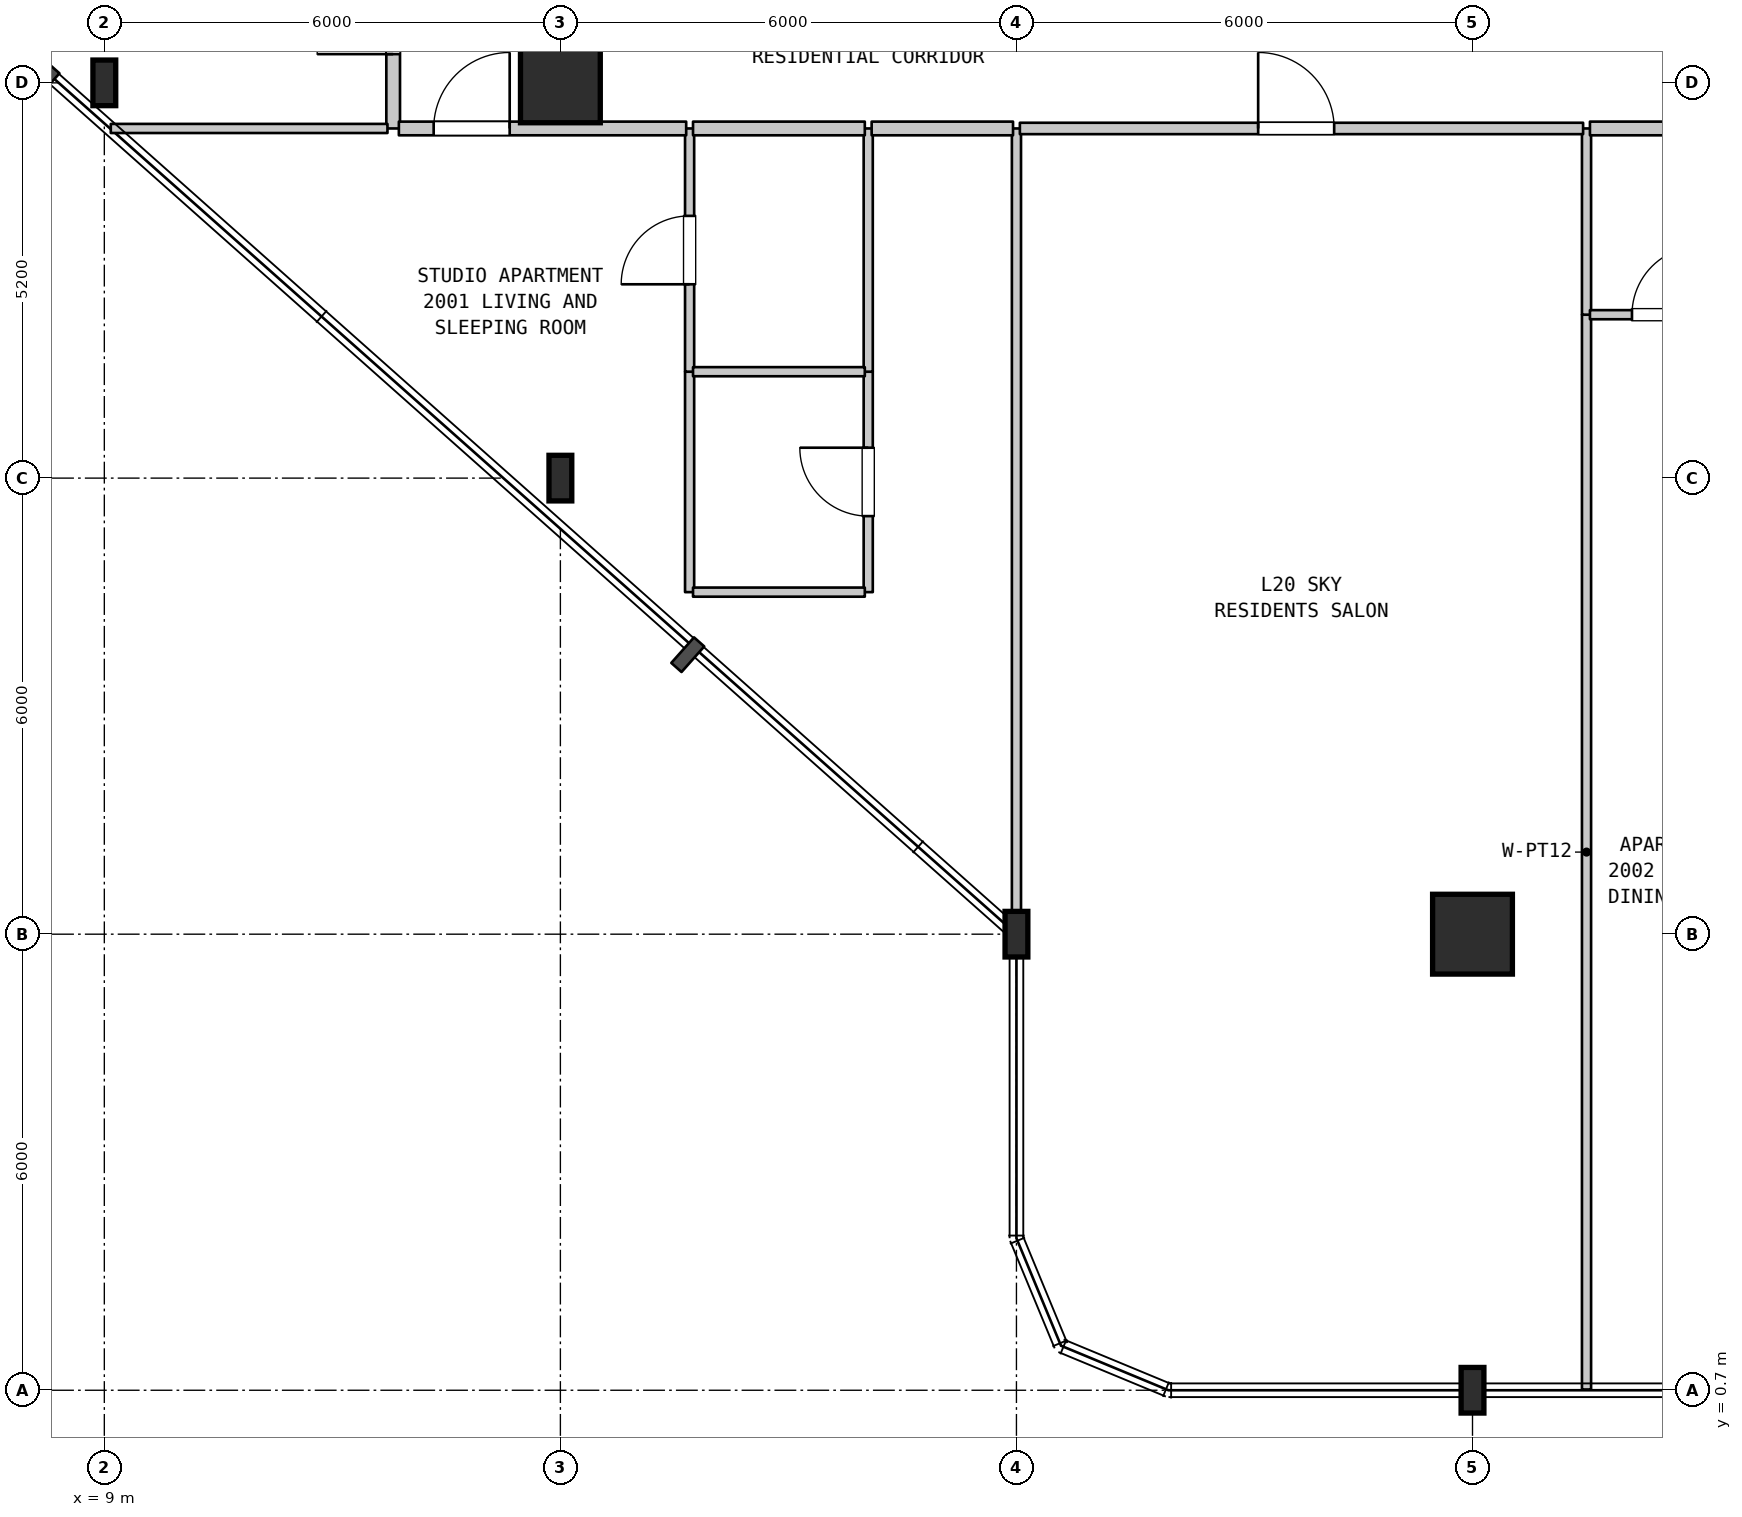
"""IFC4 building model, lengths in metres.
Left out: names, types, materials, properties, quantities, classifications, styles, units other than length and angle.
Written with IfcOpenShell. Run it as: python <this file> out.ifc"""

import sys

from ifc_helpers import new_model, si_unit, direction, frame, frame_2d, origin, origin_2d, place, context, subcontext, project, spatial, rectangle, i_section, extrude, element, fill, save


model = new_model("IFC4")
c1 = context("Model", 3, precision=1e-05, world=origin(), true_north=direction((0.0, 1.0)))
c2 = subcontext(c1, "Body", "Model", "MODEL_VIEW")
j1 = project(units=[si_unit("LENGTHUNIT", "METRE"), si_unit("PLANEANGLEUNIT", "RADIAN")], contexts=[c1])
p1 = place(None, origin())
s1 = spatial("IfcSite", under=j1, at=p1, CompositionType="ELEMENT")
p2 = place(p1, origin())
s2 = spatial("IfcBuilding", under=s1, at=p2, CompositionType="ELEMENT")
p3 = place(p2, frame((0.0, 0.0, 86.4)))
s3 = spatial("IfcBuildingStorey", under=s2, at=p3, CompositionType="ELEMENT", Elevation=86.4)
for number, where, z_axis, x_axis in (
    (1, (9.0, 17.9, 0.0), (0.0, 0.0, 1.0), (1.0, 0.0, 0.0)),
    (2, (15.0, 12.7, 0.0), (0.0, 0.0, 1.0), (1.0, 0.0, 0.0)),
):
    element("IfcColumn", number, at=place(p3, frame(where, z_axis=z_axis, x_axis=x_axis)), inside=s3, PredefinedType="COLUMN", context=c2, shape_type="SweptSolid", body=[
        extrude(i_section(OverallWidth=0.3, OverallDepth=0.6, WebThickness=0.015, FlangeThickness=0.03, FilletRadius=0.027, at=origin_2d()), origin(), (0.0, 0.0, 1.0), 4.5),
    ])
p4 = place(p3, frame((15.0, 17.9, 0.0), z_axis=(0.0, 0.0, 1.0), x_axis=(1.0, 0.0, 0.0)))
e3 = element("IfcColumn", 3, at=p4, inside=s3, PredefinedType="COLUMN", context=c2, shape_type="SweptSolid", body=[
    extrude(rectangle(XDim=1.05, YDim=1.05, at=origin_2d()), origin(), (0.0, 0.0, 1.0), 4.5),
])
for number, where, z_axis, x_axis in (
    (4, (21.0, 6.7, 0.0), (0.0, 0.0, 1.0), (1.0, 0.0, 0.0)),
    (5, (27.0, 0.7, 0.0), (0.0, 0.0, 1.0), (1.0, 0.0, 0.0)),
):
    element("IfcColumn", number, at=place(p3, frame(where, z_axis=z_axis, x_axis=x_axis)), inside=s3, PredefinedType="COLUMN", context=c2, shape_type="SweptSolid", body=[
        extrude(i_section(OverallWidth=0.3, OverallDepth=0.6, WebThickness=0.015, FlangeThickness=0.03, FilletRadius=0.027, at=origin_2d()), origin(), (0.0, 0.0, 1.0), 4.5),
    ])
p5 = place(p3, frame((27.0, 6.7, 0.0), z_axis=(0.0, 0.0, 1.0), x_axis=(1.0, 0.0, 0.0)))
e6 = element("IfcColumn", 6, at=p5, inside=s3, PredefinedType="COLUMN", context=c2, shape_type="SweptSolid", body=[
    extrude(rectangle(XDim=1.05, YDim=1.05, at=origin_2d()), origin(), (0.0, 0.0, 1.0), 4.5),
])
p6 = place(p3, frame((12.8, 17.3, 0.0), z_axis=(0.0, 0.0, 1.0), x_axis=(0.0, 1.0, 0.0)))
e7 = element("IfcWall", 7, at=p6, inside=s3, PredefinedType="STANDARD", context=c2, shape_type="SweptSolid", body=[
    extrude(rectangle(XDim=3.1, YDim=0.18, at=frame_2d((1.55, 0.0))), origin(), (0.0, 0.0, 1.0), 4.185),
])
p7 = place(p6, frame((0.978, 0.0, 0.0)))
e8 = element("IfcOpeningElement", 8, at=p7, cuts=e7, PredefinedType="OPENING", context=c2, shape_type="SweptSolid", body=[
    extrude(rectangle(XDim=1.0, YDim=2.15, at=frame_2d((0.5, 1.075))), frame((0.0, 0.1, 0.0), z_axis=(0.0, -1.0, 0.0), x_axis=(1.0, 0.0, 0.0)), (0.0, 0.0, 1.0), 0.2),
])
p8 = place(p3, frame((16.7, 11.2, 0.0), z_axis=(0.0, 0.0, 1.0), x_axis=(0.0, 1.0, 0.0)))
e9 = element("IfcWall", 9, at=p8, inside=s3, PredefinedType="PARTITIONING", context=c2, shape_type="SweptSolid", body=[
    extrude(rectangle(XDim=2.9, YDim=0.12, at=frame_2d((1.45, 0.0))), origin(), (0.0, 0.0, 1.0), 4.185),
])
p9 = place(p3, frame((16.7, 14.1, 0.0), z_axis=(0.0, 0.0, 1.0), x_axis=(0.0, 1.0, 0.0)))
e10 = element("IfcWall", 10, at=p9, inside=s3, PredefinedType="PARTITIONING", context=c2, shape_type="SweptSolid", body=[
    extrude(rectangle(XDim=3.2, YDim=0.12, at=frame_2d((1.6, 0.0))), origin(), (0.0, 0.0, 1.0), 4.185),
])
p10 = place(p9, frame((1.15, 0.0, 0.0)))
e11 = element("IfcOpeningElement", 11, at=p10, cuts=e10, PredefinedType="OPENING", context=c2, shape_type="SweptSolid", body=[
    extrude(rectangle(XDim=0.9, YDim=2.15, at=frame_2d((0.45, 1.075))), frame((0.0, 0.07, 0.0), z_axis=(0.0, -1.0, 0.0), x_axis=(1.0, 0.0, 0.0)), (0.0, 0.0, 1.0), 0.14),
])
p11 = place(p3, frame((19.05, 11.2, 0.0), z_axis=(0.0, 0.0, 1.0), x_axis=(0.0, 1.0, 0.0)))
e12 = element("IfcWall", 12, at=p11, inside=s3, PredefinedType="PARTITIONING", context=c2, shape_type="SweptSolid", body=[
    extrude(rectangle(XDim=2.9, YDim=0.12, at=frame_2d((1.45, 0.0))), origin(), (0.0, 0.0, 1.0), 4.185),
])
p12 = place(p11, frame((1.0, 0.0, 0.0)))
e13 = element("IfcOpeningElement", 13, at=p12, cuts=e12, PredefinedType="OPENING", context=c2, shape_type="SweptSolid", body=[
    extrude(rectangle(XDim=0.9, YDim=2.1, at=frame_2d((0.45, 1.05))), frame((0.0, 0.07, 0.0), z_axis=(0.0, -1.0, 0.0), x_axis=(1.0, 0.0, 0.0)), (0.0, 0.0, 1.0), 0.14),
])
p13 = place(p3, frame((19.05, 14.1, 0.0), z_axis=(0.0, 0.0, 1.0), x_axis=(0.0, 1.0, 0.0)))
e14 = element("IfcWall", 14, at=p13, inside=s3, PredefinedType="PARTITIONING", context=c2, shape_type="SweptSolid", body=[
    extrude(rectangle(XDim=3.2, YDim=0.12, at=frame_2d((1.6, 0.0))), origin(), (0.0, 0.0, 1.0), 4.185),
])
p14 = place(p3, frame((21.0, 6.71, 0.0), z_axis=(0.0, 0.0, 1.0), x_axis=(0.0, 1.0, 0.0)))
e15 = element("IfcWall", 15, at=p14, inside=s3, PredefinedType="PARTITIONING", context=c2, shape_type="SweptSolid", body=[
    extrude(rectangle(XDim=10.59, YDim=0.12, at=frame_2d((5.295, 0.0))), origin(), (0.0, 0.0, 1.0), 4.185),
])
p15 = place(p3, frame((28.5, 0.71, 0.0), z_axis=(0.0, 0.0, 1.0), x_axis=(0.0, 1.0, 0.0)))
e16 = element("IfcWall", 16, at=p15, inside=s3, PredefinedType="PARTITIONING", context=c2, shape_type="SweptSolid", body=[
    extrude(rectangle(XDim=14.14, YDim=0.12, at=frame_2d((7.07, 0.0))), origin(), (0.0, 0.0, 1.0), 4.185),
])
p16 = place(p3, frame((28.5, 14.85, 0.0), z_axis=(0.0, 0.0, 1.0), x_axis=(0.0, 1.0, 0.0)))
e17 = element("IfcWall", 17, at=p16, inside=s3, PredefinedType="PARTITIONING", context=c2, shape_type="SweptSolid", body=[
    extrude(rectangle(XDim=2.45, YDim=0.12, at=frame_2d((1.225, 0.0))), origin(), (0.0, 0.0, 1.0), 4.185),
])
for number, where, z_axis, x_axis in (
    (18, (16.745, 11.2, 0.0), (0.0, 0.0, 1.0), (1.0, 0.0, 0.0)),
    (19, (16.745, 14.1, 0.0), (0.0, 0.0, 1.0), (1.0, 0.0, 0.0)),
):
    element("IfcWall", number, at=place(p3, frame(where, z_axis=z_axis, x_axis=x_axis)), inside=s3, PredefinedType="PARTITIONING", context=c2, shape_type="SweptSolid", body=[
        extrude(rectangle(XDim=2.26, YDim=0.12, at=frame_2d((1.13, 0.0))), origin(), (0.0, 0.0, 1.0), 4.185),
    ])
p17 = place(p3, frame((28.545, 14.85, 0.0), z_axis=(0.0, 0.0, 1.0), x_axis=(1.0, 0.0, 0.0)))
e20 = element("IfcWall", 20, at=p17, inside=s3, PredefinedType="PARTITIONING", context=c2, shape_type="SweptSolid", body=[
    extrude(rectangle(XDim=2.16, YDim=0.12, at=frame_2d((1.08, 0.0))), origin(), (0.0, 0.0, 1.0), 4.185),
])
p18 = place(p17, frame((0.553, 0.0, 0.0)))
e21 = element("IfcOpeningElement", 21, at=p18, cuts=e20, PredefinedType="OPENING", context=c2, shape_type="SweptSolid", body=[
    extrude(rectangle(XDim=0.9, YDim=2.15, at=frame_2d((0.45, 1.075))), frame((0.0, 0.07, 0.0), z_axis=(0.0, -1.0, 0.0), x_axis=(1.0, 0.0, 0.0)), (0.0, 0.0, 1.0), 0.14),
])
p19 = place(p3, frame((9.085, 17.3, 0.0), z_axis=(0.0, 0.0, 1.0), x_axis=(1.0, 0.0, 0.0)))
e22 = element("IfcWall", 22, at=p19, inside=s3, PredefinedType="PARTITIONING", context=c2, shape_type="SweptSolid", body=[
    extrude(rectangle(XDim=3.64, YDim=0.12, at=frame_2d((1.82, 0.0))), origin(), (0.0, 0.0, 1.0), 4.185),
])
p20 = place(p3, frame((12.875, 17.3, 0.0), z_axis=(0.0, 0.0, 1.0), x_axis=(1.0, 0.0, 0.0)))
e23 = element("IfcWall", 23, at=p20, inside=s3, PredefinedType="STANDARD", context=c2, shape_type="SweptSolid", body=[
    extrude(rectangle(XDim=3.78, YDim=0.18, at=frame_2d((1.89, 0.0))), origin(), (0.0, 0.0, 1.0), 4.185),
])
p21 = place(p20, frame((0.458, 0.0, 0.0)))
e24 = element("IfcOpeningElement", 24, at=p21, cuts=e23, PredefinedType="OPENING", context=c2, shape_type="SweptSolid", body=[
    extrude(rectangle(XDim=1.0, YDim=2.15, at=frame_2d((0.5, 1.075))), frame((0.0, 0.1, 0.0), z_axis=(0.0, -1.0, 0.0), x_axis=(1.0, 0.0, 0.0)), (0.0, 0.0, 1.0), 0.2),
])
p22 = place(p3, frame((16.745, 17.3, 0.0), z_axis=(0.0, 0.0, 1.0), x_axis=(1.0, 0.0, 0.0)))
e25 = element("IfcWall", 25, at=p22, inside=s3, PredefinedType="STANDARD", context=c2, shape_type="SweptSolid", body=[
    extrude(rectangle(XDim=2.26, YDim=0.18, at=frame_2d((1.13, 0.0))), origin(), (0.0, 0.0, 1.0), 4.185),
])
p23 = place(p3, frame((19.095, 17.3, 0.0), z_axis=(0.0, 0.0, 1.0), x_axis=(1.0, 0.0, 0.0)))
e26 = element("IfcWall", 26, at=p23, inside=s3, PredefinedType="STANDARD", context=c2, shape_type="SweptSolid", body=[
    extrude(rectangle(XDim=1.86, YDim=0.18, at=frame_2d((0.93, 0.0))), origin(), (0.0, 0.0, 1.0), 4.185),
])
p24 = place(p3, frame((21.045, 17.3, 0.0), z_axis=(0.0, 0.0, 1.0), x_axis=(1.0, 0.0, 0.0)))
e27 = element("IfcWall", 27, at=p24, inside=s3, PredefinedType="STANDARD", context=c2, shape_type="SweptSolid", body=[
    extrude(rectangle(XDim=7.41, YDim=0.15, at=frame_2d((3.705, 0.0))), origin(), (0.0, 0.0, 1.0), 4.185),
])
p25 = place(p24, frame((3.135, 0.0, 0.0)))
e28 = element("IfcOpeningElement", 28, at=p25, cuts=e27, PredefinedType="OPENING", context=c2, shape_type="SweptSolid", body=[
    extrude(rectangle(XDim=1.0, YDim=2.15, at=frame_2d((0.5, 1.075))), frame((0.0, 0.085, 0.0), z_axis=(0.0, -1.0, 0.0), x_axis=(1.0, 0.0, 0.0)), (0.0, 0.0, 1.0), 0.17),
])
p26 = place(p3, frame((28.545, 17.3, 0.0), z_axis=(0.0, 0.0, 1.0), x_axis=(1.0, 0.0, 0.0)))
e29 = element("IfcWall", 29, at=p26, inside=s3, PredefinedType="STANDARD", context=c2, shape_type="SweptSolid", body=[
    extrude(rectangle(XDim=4.72, YDim=0.18, at=frame_2d((2.36, 0.0))), origin(), (0.0, 0.0, 1.0), 4.185),
])
p27 = place(p26, frame((1.788, 0.0, 0.0)))
e30 = element("IfcOpeningElement", 30, at=p27, cuts=e29, PredefinedType="OPENING", context=c2, shape_type="SweptSolid", body=[
    extrude(rectangle(XDim=1.0, YDim=2.15, at=frame_2d((0.5, 1.075))), frame((0.0, 0.1, 0.0), z_axis=(0.0, -1.0, 0.0), x_axis=(1.0, 0.0, 0.0)), (0.0, 0.0, 1.0), 0.2),
])
p28 = place(p7, origin())
e31 = element("IfcDoor", 31, at=p28, inside=s3, OperationType="SINGLE_SWING_LEFT", PredefinedType="DOOR", context=c2, shape_type="SweptSolid", body=[
    extrude(rectangle(XDim=1.0, YDim=2.15, at=frame_2d((0.5, 1.075))), frame((0.0, 0.025, 0.0), z_axis=(0.0, -1.0, 0.0), x_axis=(1.0, 0.0, 0.0)), (0.0, 0.0, 1.0), 0.05),
])
fill(e8, e31)
p29 = place(p10, origin())
e32 = element("IfcDoor", 32, at=p29, inside=s3, OperationType="SINGLE_SWING_LEFT", PredefinedType="DOOR", context=c2, shape_type="SweptSolid", body=[
    extrude(rectangle(XDim=0.9, YDim=2.15, at=frame_2d((0.45, 1.075))), frame((0.0, 0.025, 0.0), z_axis=(0.0, -1.0, 0.0), x_axis=(1.0, 0.0, 0.0)), (0.0, 0.0, 1.0), 0.05),
])
fill(e11, e32)
p30 = place(p12, origin())
e33 = element("IfcDoor", 33, at=p30, inside=s3, OperationType="SINGLE_SWING_RIGHT", PredefinedType="DOOR", context=c2, shape_type="SweptSolid", body=[
    extrude(rectangle(XDim=0.9, YDim=2.1, at=frame_2d((0.45, 1.05))), frame((0.0, 0.025, 0.0), z_axis=(0.0, -1.0, 0.0), x_axis=(1.0, 0.0, 0.0)), (0.0, 0.0, 1.0), 0.05),
])
fill(e13, e33)
p31 = place(p18, origin())
e34 = element("IfcDoor", 34, at=p31, inside=s3, OperationType="SINGLE_SWING_RIGHT", PredefinedType="DOOR", context=c2, shape_type="SweptSolid", body=[
    extrude(rectangle(XDim=0.9, YDim=2.15, at=frame_2d((0.45, 1.075))), frame((0.0, 0.025, 0.0), z_axis=(0.0, -1.0, 0.0), x_axis=(1.0, 0.0, 0.0)), (0.0, 0.0, 1.0), 0.05),
])
fill(e21, e34)
p32 = place(p21, origin())
e35 = element("IfcDoor", 35, at=p32, inside=s3, OperationType="SINGLE_SWING_RIGHT", PredefinedType="DOOR", context=c2, shape_type="SweptSolid", body=[
    extrude(rectangle(XDim=1.0, YDim=2.15, at=frame_2d((0.5, 1.075))), frame((0.0, 0.025, 0.0), z_axis=(0.0, -1.0, 0.0), x_axis=(1.0, 0.0, 0.0)), (0.0, 0.0, 1.0), 0.05),
])
fill(e24, e35)
p33 = place(p25, origin())
e36 = element("IfcDoor", 36, at=p33, inside=s3, OperationType="SINGLE_SWING_LEFT", PredefinedType="DOOR", context=c2, shape_type="SweptSolid", body=[
    extrude(rectangle(XDim=1.0, YDim=2.15, at=frame_2d((0.5, 1.075))), frame((0.0, 0.025, 0.0), z_axis=(0.0, -1.0, 0.0), x_axis=(1.0, 0.0, 0.0)), (0.0, 0.0, 1.0), 0.05),
])
fill(e28, e36)
save(model, sys.argv[1])
